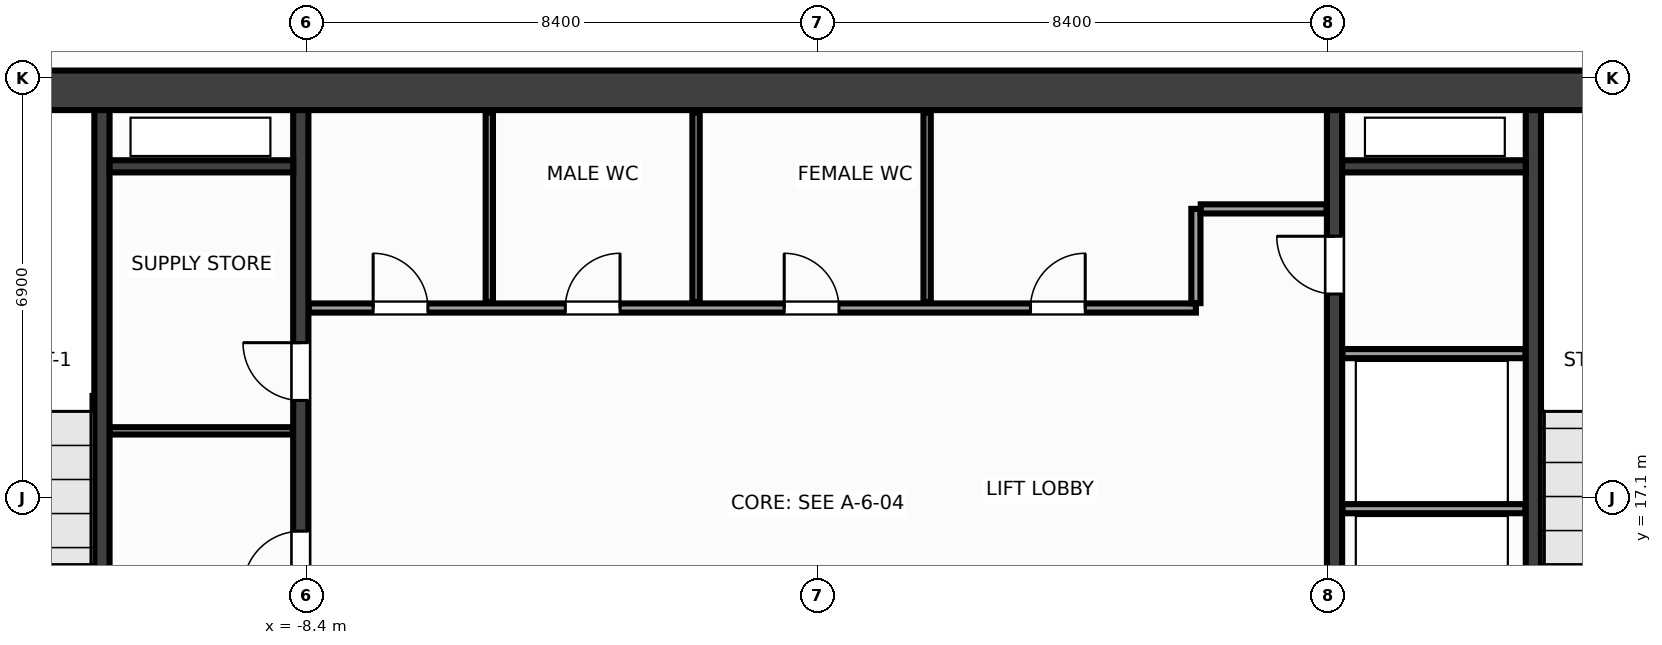
"""IFC4 building model, lengths in metres.
Left out: names, types, materials, properties, quantities, classifications, styles, units other than length and angle.
Written with IfcOpenShell. Run it as: python <this file> out.ifc"""

import sys

from ifc_helpers import new_model, si_unit, direction, frame, frame_2d, origin, place, context, subcontext, project, spatial, rectangle, extrude, source, transform, mapped, element, fill, save


model = new_model("IFC4")
c1 = context("Model", 3, precision=1e-05, world=origin(), true_north=direction((0.0, 1.0)))
c2 = subcontext(c1, "Body", "Model", "MODEL_VIEW")
j1 = project(units=[si_unit("LENGTHUNIT", "METRE"), si_unit("PLANEANGLEUNIT", "RADIAN")], contexts=[c1])
p1 = place(None, origin())
s1 = spatial("IfcSite", under=j1, at=p1, CompositionType="ELEMENT")
p2 = place(p1, origin())
s2 = spatial("IfcBuilding", under=s1, at=p2, CompositionType="ELEMENT")
p3 = place(p2, frame((0.0, 0.0, 120.8)))
s3 = spatial("IfcBuildingStorey", under=s2, at=p3, CompositionType="ELEMENT", Elevation=120.8)
m1 = source(origin(), c2, "Body", "SweptSolid", [
    extrude(rectangle(XDim=31.85, YDim=0.65, at=frame_2d((15.925, 0.0))), origin(), (0.0, 0.0, 1.0), 3.6),
])
p4 = place(p3, frame((-15.925, 23.8, 0.0), z_axis=(0.0, 0.0, 1.0), x_axis=(1.0, 0.0, 0.0)))
e1 = element("IfcWall", 1, at=p4, inside=s3, PredefinedType="SHEAR", context=c2, shape_type="MappedRepresentation", body=[
    mapped(m1, transform((0.0, 0.0, 0.0), x_axis=(1.0, 0.0, 0.0), y_axis=(0.0, 1.0, 0.0), z_axis=(0.0, 0.0, 1.0), scale=1.0)),
])
m2 = source(origin(), c2, "Body", "SweptSolid", [
    extrude(rectangle(XDim=12.95, YDim=0.25, at=frame_2d((6.475, 0.0))), origin(), (0.0, 0.0, 1.0), 3.6),
])
p5 = place(p3, frame((-8.5, 10.525, 0.0), z_axis=(0.0, 0.0, 1.0), x_axis=(0.0, 1.0, 0.0)))
e2 = element("IfcWall", 2, at=p5, inside=s3, PredefinedType="SHEAR", context=c2, shape_type="MappedRepresentation", body=[
    mapped(m2, transform((0.0, 0.0, 0.0), x_axis=(1.0, 0.0, 0.0), y_axis=(0.0, 1.0, 0.0), z_axis=(0.0, 0.0, 1.0), scale=1.0)),
])
p6 = place(p5, frame((5.075, 0.0, 0.0)))
e3 = element("IfcOpeningElement", 3, at=p6, cuts=e2, PredefinedType="OPENING", context=c2, shape_type="SweptSolid", body=[
    extrude(rectangle(XDim=0.95, YDim=2.15, at=frame_2d((0.475, 1.075))), frame((0.0, 0.137, 0.0), z_axis=(0.0, -1.0, 0.0), x_axis=(1.0, 0.0, 0.0)), (0.0, 0.0, 1.0), 0.274),
])
p7 = place(p5, frame((8.175, 0.0, 0.0)))
e4 = element("IfcOpeningElement", 4, at=p7, cuts=e2, PredefinedType="OPENING", context=c2, shape_type="SweptSolid", body=[
    extrude(rectangle(XDim=0.95, YDim=2.15, at=frame_2d((0.475, 1.075))), frame((0.0, 0.137, 0.0), z_axis=(0.0, -1.0, 0.0), x_axis=(1.0, 0.0, 0.0)), (0.0, 0.0, 1.0), 0.274),
])
p8 = place(p3, frame((8.5, 10.525, 0.0), z_axis=(0.0, 0.0, 1.0), x_axis=(0.0, 1.0, 0.0)))
e5 = element("IfcWall", 5, at=p8, inside=s3, PredefinedType="SHEAR", context=c2, shape_type="MappedRepresentation", body=[
    mapped(m2, transform((0.0, 0.0, 0.0), x_axis=(1.0, 0.0, 0.0), y_axis=(0.0, 1.0, 0.0), z_axis=(0.0, 0.0, 1.0), scale=1.0)),
])
p9 = place(p8, frame((9.925, 0.0, 0.0)))
e6 = element("IfcOpeningElement", 6, at=p9, cuts=e5, PredefinedType="OPENING", context=c2, shape_type="SweptSolid", body=[
    extrude(rectangle(XDim=0.95, YDim=2.15, at=frame_2d((0.475, 1.075))), frame((0.0, 0.137, 0.0), z_axis=(0.0, -1.0, 0.0), x_axis=(1.0, 0.0, 0.0)), (0.0, 0.0, 1.0), 0.274),
])
m3 = source(origin(), c2, "Body", "SweptSolid", [
    extrude(rectangle(XDim=9.1, YDim=0.25, at=frame_2d((4.55, 0.0))), origin(), (0.0, 0.0, 1.0), 3.6),
])
for number, where, z_axis, x_axis in (
    (7, (-11.77, 14.375, 0.0), (0.0, 0.0, 1.0), (0.0, 1.0, 0.0)),
    (8, (11.77, 14.375, 0.0), (0.0, 0.0, 1.0), (0.0, 1.0, 0.0)),
):
    element("IfcWall", number, at=place(p3, frame(where, z_axis=z_axis, x_axis=x_axis)), inside=s3, PredefinedType="SHEAR", context=c2, shape_type="MappedRepresentation", body=[
        mapped(m3, transform((0.0, 0.0, 0.0), x_axis=(1.0, 0.0, 0.0), y_axis=(0.0, 1.0, 0.0), z_axis=(0.0, 0.0, 1.0), scale=1.0)),
    ])
m4 = source(origin(), c2, "Body", "SweptSolid", [
    extrude(rectangle(XDim=3.02, YDim=0.2, at=frame_2d((1.51, 0.0))), origin(), (0.0, 0.0, 1.0), 3.6),
])
for number, where, z_axis, x_axis in (
    (9, (-11.645, 22.55, 0.0), (0.0, 0.0, 1.0), (1.0, 0.0, 0.0)),
    (10, (8.625, 22.55, 0.0), (0.0, 0.0, 1.0), (1.0, 0.0, 0.0)),
):
    element("IfcWall", number, at=place(p3, frame(where, z_axis=z_axis, x_axis=x_axis)), inside=s3, PredefinedType="SHEAR", context=c2, shape_type="MappedRepresentation", body=[
        mapped(m4, transform((0.0, 0.0, 0.0), x_axis=(1.0, 0.0, 0.0), y_axis=(0.0, 1.0, 0.0), z_axis=(0.0, 0.0, 1.0), scale=1.0)),
    ])
m5 = source(origin(), c2, "Body", "SweptSolid", [
    extrude(rectangle(XDim=3.01, YDim=0.12, at=frame_2d((1.505, 0.0))), origin(), (0.0, 0.0, 1.0), 3.3),
])
p10 = place(p3, frame((-11.64, 18.2, 0.0), z_axis=(0.0, 0.0, 1.0), x_axis=(1.0, 0.0, 0.0)))
e11 = element("IfcWall", 11, at=p10, inside=s3, PredefinedType="PARTITIONING", context=c2, shape_type="MappedRepresentation", body=[
    mapped(m5, transform((0.0, 0.0, 0.0), x_axis=(1.0, 0.0, 0.0), y_axis=(0.0, 1.0, 0.0), z_axis=(0.0, 0.0, 1.0), scale=1.0)),
])
m6 = source(origin(), c2, "Body", "SweptSolid", [
    extrude(rectangle(XDim=3.01, YDim=0.15, at=frame_2d((1.505, 0.0))), origin(), (0.0, 0.0, 1.0), 3.3),
])
for number, where, z_axis, x_axis in (
    (12, (8.63, 16.92, 0.0), (0.0, 0.0, 1.0), (1.0, 0.0, 0.0)),
    (13, (8.63, 19.47, 0.0), (0.0, 0.0, 1.0), (1.0, 0.0, 0.0)),
):
    element("IfcWall", number, at=place(p3, frame(where, z_axis=z_axis, x_axis=x_axis)), inside=s3, PredefinedType="PARTITIONING", context=c2, shape_type="MappedRepresentation", body=[
        mapped(m6, transform((0.0, 0.0, 0.0), x_axis=(1.0, 0.0, 0.0), y_axis=(0.0, 1.0, 0.0), z_axis=(0.0, 0.0, 1.0), scale=1.0)),
    ])
m7 = source(origin(), c2, "Body", "SweptSolid", [
    extrude(rectangle(XDim=14.59, YDim=0.15, at=frame_2d((7.295, 0.0))), origin(), (0.0, 0.0, 1.0), 3.3),
])
p11 = place(p3, frame((-8.37, 20.22, 0.0), z_axis=(0.0, 0.0, 1.0), x_axis=(1.0, 0.0, 0.0)))
e14 = element("IfcWall", 14, at=p11, inside=s3, PredefinedType="PARTITIONING", context=c2, shape_type="MappedRepresentation", body=[
    mapped(m7, transform((0.0, 0.0, 0.0), x_axis=(1.0, 0.0, 0.0), y_axis=(0.0, 1.0, 0.0), z_axis=(0.0, 0.0, 1.0), scale=1.0)),
])
p12 = place(p11, frame((1.06, 0.0, 0.0)))
e15 = element("IfcOpeningElement", 15, at=p12, cuts=e14, PredefinedType="OPENING", context=c2, shape_type="SweptSolid", body=[
    extrude(rectangle(XDim=0.9, YDim=2.15, at=frame_2d((0.45, 1.075))), frame((0.0, 0.087, 0.0), z_axis=(0.0, -1.0, 0.0), x_axis=(1.0, 0.0, 0.0)), (0.0, 0.0, 1.0), 0.174),
])
p13 = place(p11, frame((4.22, 0.0, 0.0)))
e16 = element("IfcOpeningElement", 16, at=p13, cuts=e14, PredefinedType="OPENING", context=c2, shape_type="SweptSolid", body=[
    extrude(rectangle(XDim=0.9, YDim=2.15, at=frame_2d((0.45, 1.075))), frame((0.0, 0.087, 0.0), z_axis=(0.0, -1.0, 0.0), x_axis=(1.0, 0.0, 0.0)), (0.0, 0.0, 1.0), 0.174),
])
p14 = place(p11, frame((7.82, 0.0, 0.0)))
e17 = element("IfcOpeningElement", 17, at=p14, cuts=e14, PredefinedType="OPENING", context=c2, shape_type="SweptSolid", body=[
    extrude(rectangle(XDim=0.9, YDim=2.15, at=frame_2d((0.45, 1.075))), frame((0.0, 0.087, 0.0), z_axis=(0.0, -1.0, 0.0), x_axis=(1.0, 0.0, 0.0)), (0.0, 0.0, 1.0), 0.174),
])
p15 = place(p11, frame((11.87, 0.0, 0.0)))
e18 = element("IfcOpeningElement", 18, at=p15, cuts=e14, PredefinedType="OPENING", context=c2, shape_type="SweptSolid", body=[
    extrude(rectangle(XDim=0.9, YDim=2.15, at=frame_2d((0.45, 1.075))), frame((0.0, 0.087, 0.0), z_axis=(0.0, -1.0, 0.0), x_axis=(1.0, 0.0, 0.0)), (0.0, 0.0, 1.0), 0.174),
])
m8 = source(origin(), c2, "Body", "SweptSolid", [
    extrude(rectangle(XDim=1.55, YDim=0.15, at=frame_2d((0.775, 0.0))), origin(), (0.0, 0.0, 1.0), 3.3),
])
p16 = place(p3, frame((6.22, 20.3, 0.0), z_axis=(0.0, 0.0, 1.0), x_axis=(0.0, 1.0, 0.0)))
e19 = element("IfcWall", 19, at=p16, inside=s3, PredefinedType="PARTITIONING", context=c2, shape_type="MappedRepresentation", body=[
    mapped(m8, transform((0.0, 0.0, 0.0), x_axis=(1.0, 0.0, 0.0), y_axis=(0.0, 1.0, 0.0), z_axis=(0.0, 0.0, 1.0), scale=1.0)),
])
m9 = source(origin(), c2, "Body", "SweptSolid", [
    extrude(rectangle(XDim=2.07, YDim=0.15, at=frame_2d((1.035, 0.0))), origin(), (0.0, 0.0, 1.0), 3.3),
])
p17 = place(p3, frame((6.3, 21.85, 0.0), z_axis=(0.0, 0.0, 1.0), x_axis=(1.0, 0.0, 0.0)))
e20 = element("IfcWall", 20, at=p17, inside=s3, PredefinedType="PARTITIONING", context=c2, shape_type="MappedRepresentation", body=[
    mapped(m9, transform((0.0, 0.0, 0.0), x_axis=(1.0, 0.0, 0.0), y_axis=(0.0, 1.0, 0.0), z_axis=(0.0, 0.0, 1.0), scale=1.0)),
])
m10 = source(origin(), c2, "Body", "SweptSolid", [
    extrude(rectangle(XDim=3.115, YDim=0.12, at=frame_2d((1.558, 0.0))), origin(), (0.0, 0.0, 1.0), 3.3),
])
for number, where, z_axis, x_axis in (
    (21, (-5.4, 20.32, 0.0), (0.0, 0.0, 1.0), (0.0, 1.0, 0.0)),
    (22, (-2.0, 20.32, 0.0), (0.0, 0.0, 1.0), (0.0, 1.0, 0.0)),
    (23, (1.8, 20.32, 0.0), (0.0, 0.0, 1.0), (0.0, 1.0, 0.0)),
):
    element("IfcWall", number, at=place(p3, frame(where, z_axis=z_axis, x_axis=x_axis)), inside=s3, PredefinedType="PARTITIONING", context=c2, shape_type="MappedRepresentation", body=[
        mapped(m10, transform((0.0, 0.0, 0.0), x_axis=(1.0, 0.0, 0.0), y_axis=(0.0, 1.0, 0.0), z_axis=(0.0, 0.0, 1.0), scale=1.0)),
    ])
m11 = source(origin(), c2, "Body", "SweptSolid", [
    extrude(rectangle(XDim=0.95, YDim=2.15, at=frame_2d((0.475, 1.075))), frame((0.0, 0.025, 0.0), z_axis=(0.0, -1.0, 0.0), x_axis=(1.0, 0.0, 0.0)), (0.0, 0.0, 1.0), 0.05),
])
p18 = place(p6, origin())
e24 = element("IfcDoor", 24, at=p18, inside=s3, OperationType="SINGLE_SWING_LEFT", PredefinedType="DOOR", context=c2, shape_type="MappedRepresentation", body=[
    mapped(m11, transform((0.0, 0.0, 0.0), x_axis=(1.0, 0.0, 0.0), y_axis=(0.0, 1.0, 0.0), z_axis=(0.0, 0.0, 1.0), scale=1.0)),
])
fill(e3, e24)
p19 = place(p7, origin())
e25 = element("IfcDoor", 25, at=p19, inside=s3, OperationType="SINGLE_SWING_RIGHT", PredefinedType="DOOR", context=c2, shape_type="MappedRepresentation", body=[
    mapped(m11, transform((0.0, 0.0, 0.0), x_axis=(1.0, 0.0, 0.0), y_axis=(0.0, 1.0, 0.0), z_axis=(0.0, 0.0, 1.0), scale=1.0)),
])
fill(e4, e25)
m12 = source(origin(), c2, "Body", "SweptSolid", [
    extrude(rectangle(XDim=0.95, YDim=2.15, at=frame_2d((0.475, 1.075))), frame((0.0, 0.025, 0.0), z_axis=(0.0, -1.0, 0.0), x_axis=(1.0, 0.0, 0.0)), (0.0, 0.0, 1.0), 0.05),
])
p20 = place(p9, origin())
e26 = element("IfcDoor", 26, at=p20, inside=s3, OperationType="SINGLE_SWING_RIGHT", PredefinedType="DOOR", context=c2, shape_type="MappedRepresentation", body=[
    mapped(m12, transform((0.0, 0.0, 0.0), x_axis=(1.0, 0.0, 0.0), y_axis=(0.0, 1.0, 0.0), z_axis=(0.0, 0.0, 1.0), scale=1.0)),
])
fill(e6, e26)
m13 = source(origin(), c2, "Body", "SweptSolid", [
    extrude(rectangle(XDim=0.9, YDim=2.15, at=frame_2d((0.45, 1.075))), frame((0.0, 0.025, 0.0), z_axis=(0.0, -1.0, 0.0), x_axis=(1.0, 0.0, 0.0)), (0.0, 0.0, 1.0), 0.05),
])
p21 = place(p12, origin())
e27 = element("IfcDoor", 27, at=p21, inside=s3, OperationType="SINGLE_SWING_LEFT", PredefinedType="DOOR", context=c2, shape_type="MappedRepresentation", body=[
    mapped(m13, transform((0.0, 0.0, 0.0), x_axis=(1.0, 0.0, 0.0), y_axis=(0.0, 1.0, 0.0), z_axis=(0.0, 0.0, 1.0), scale=1.0)),
])
fill(e15, e27)
p22 = place(p13, origin())
e28 = element("IfcDoor", 28, at=p22, inside=s3, OperationType="SINGLE_SWING_RIGHT", PredefinedType="DOOR", context=c2, shape_type="MappedRepresentation", body=[
    mapped(m13, transform((0.0, 0.0, 0.0), x_axis=(1.0, 0.0, 0.0), y_axis=(0.0, 1.0, 0.0), z_axis=(0.0, 0.0, 1.0), scale=1.0)),
])
fill(e16, e28)
p23 = place(p14, origin())
e29 = element("IfcDoor", 29, at=p23, inside=s3, OperationType="SINGLE_SWING_LEFT", PredefinedType="DOOR", context=c2, shape_type="MappedRepresentation", body=[
    mapped(m13, transform((0.0, 0.0, 0.0), x_axis=(1.0, 0.0, 0.0), y_axis=(0.0, 1.0, 0.0), z_axis=(0.0, 0.0, 1.0), scale=1.0)),
])
fill(e17, e29)
p24 = place(p15, origin())
e30 = element("IfcDoor", 30, at=p24, inside=s3, OperationType="SINGLE_SWING_RIGHT", PredefinedType="DOOR", context=c2, shape_type="MappedRepresentation", body=[
    mapped(m13, transform((0.0, 0.0, 0.0), x_axis=(1.0, 0.0, 0.0), y_axis=(0.0, 1.0, 0.0), z_axis=(0.0, 0.0, 1.0), scale=1.0)),
])
fill(e18, e30)
save(model, sys.argv[1])
